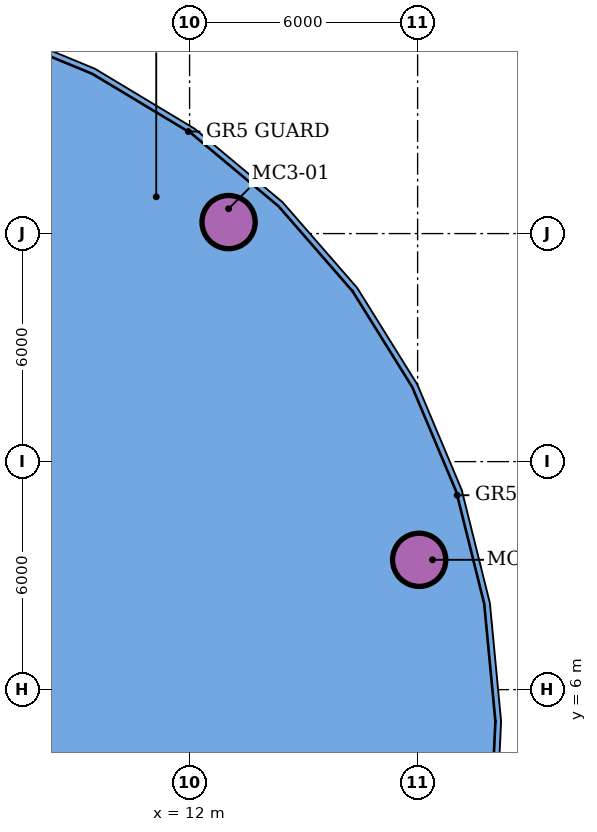
"""IFC4 building model, lengths in metres.
Left out: names, types, materials, properties, quantities, classifications, styles, units other than length and angle.
Written with IfcOpenShell. Run it as: python <this file> out.ifc"""

import sys

from ifc_helpers import new_model, si_unit, direction, frame, origin, origin_2d, place, context, subcontext, project, spatial, hollow_circle, extrude, element, save


model = new_model("IFC4")
c1 = context("Model", 3, precision=1e-05, world=origin(), true_north=direction((0.0, 1.0)))
c2 = subcontext(c1, "Body", "Model", "MODEL_VIEW")
j1 = project(units=[si_unit("LENGTHUNIT", "METRE"), si_unit("PLANEANGLEUNIT", "RADIAN")], contexts=[c1])
p1 = place(None, origin())
s1 = spatial("IfcSite", under=j1, at=p1, CompositionType="ELEMENT")
p2 = place(p1, origin())
s2 = spatial("IfcBuilding", under=s1, at=p2, CompositionType="ELEMENT")
p3 = place(p2, frame((0.0, 0.0, 179.4)))
s3 = spatial("IfcBuildingStorey", under=s2, at=p3, CompositionType="ELEMENT", Elevation=179.4)
for number, where, z_axis, x_axis in (
    (1, (13.026, 18.303, 0.0), (0.0, 0.0, 1.0), (1.0, 0.0, 0.0)),
    (2, (18.041, 9.417, 0.0), (0.0, 0.0, 1.0), (1.0, 0.0, 0.0)),
):
    element("IfcColumn", number, at=place(p3, frame(where, z_axis=z_axis, x_axis=x_axis)), inside=s3, PredefinedType="COLUMN", context=c2, shape_type="SweptSolid", body=[
        extrude(hollow_circle(Radius=0.7, WallThickness=0.05, at=origin_2d()), origin(), (0.0, 0.0, 1.0), 3.45),
    ])
save(model, sys.argv[1])
